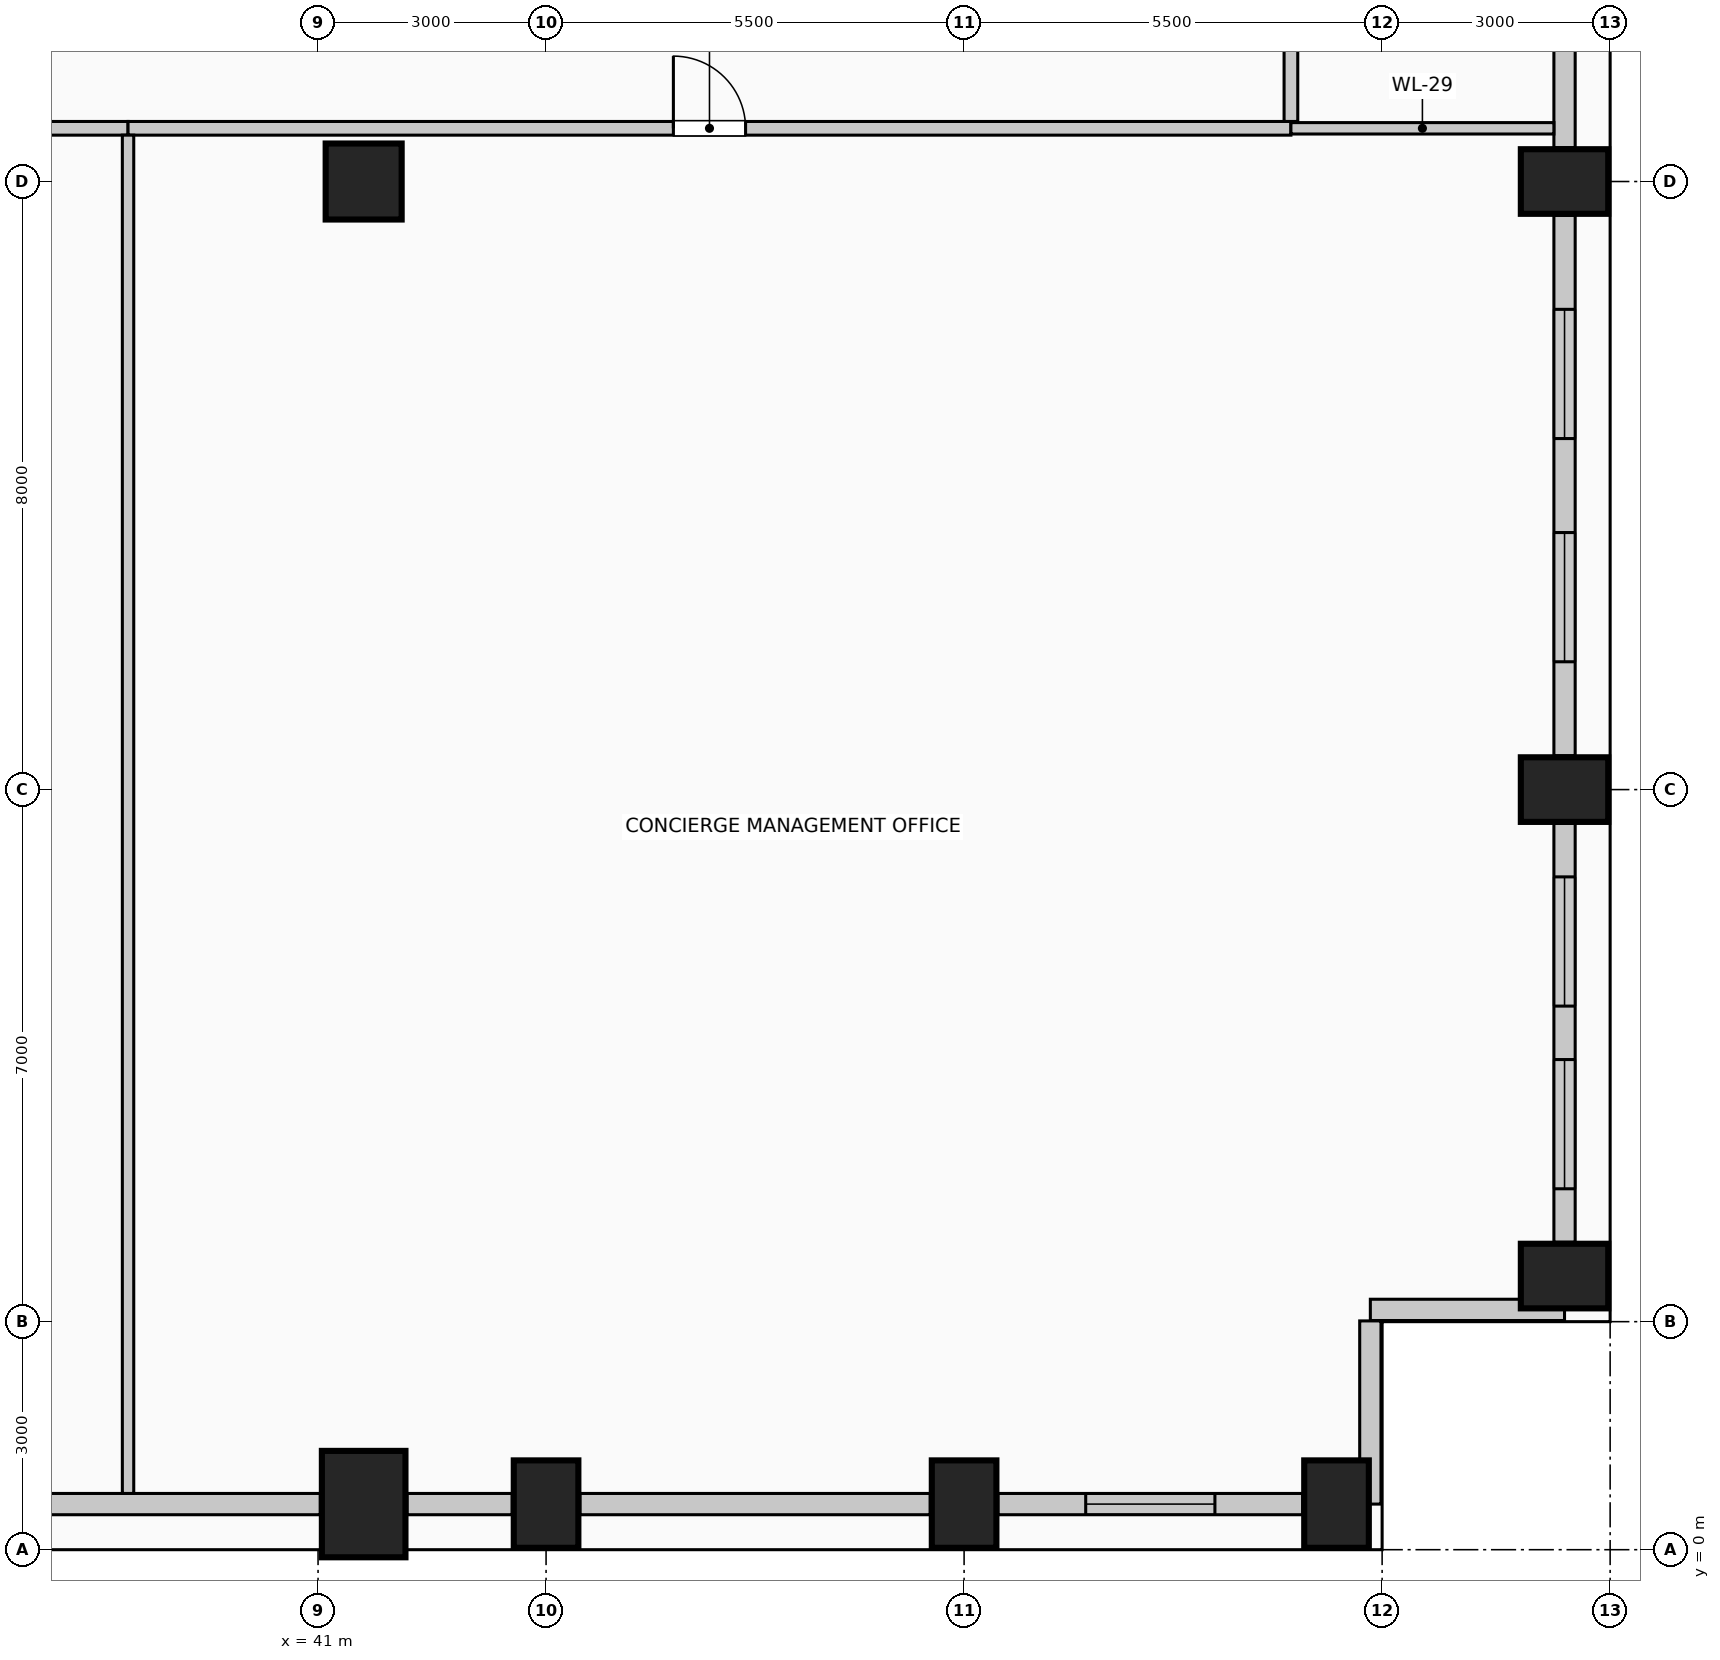
"""IFC4 building model, lengths in metres.
Left out: names, types, materials, properties, quantities, classifications, styles, units other than length and angle.
Written with IfcOpenShell. Run it as: python <this file> out.ifc"""

import sys

from ifc_helpers import new_model, si_unit, direction, frame, frame_2d, origin, origin_2d, place, context, subcontext, project, spatial, rectangle, circle, extrude, element, fill, save


model = new_model("IFC4")
c1 = context("Model", 3, precision=1e-05, world=origin(), true_north=direction((0.0, 1.0)))
c2 = subcontext(c1, "Body", "Model", "MODEL_VIEW")
j1 = project(units=[si_unit("LENGTHUNIT", "METRE"), si_unit("PLANEANGLEUNIT", "RADIAN")], contexts=[c1])
p1 = place(None, origin())
s1 = spatial("IfcSite", under=j1, at=p1, CompositionType="ELEMENT")
p2 = place(p1, origin())
s2 = spatial("IfcBuilding", under=s1, at=p2, CompositionType="ELEMENT")
p3 = place(p2, frame((0.0, 0.0, 87.8)))
s3 = spatial("IfcBuildingStorey", under=s2, at=p3, CompositionType="ELEMENT", Elevation=87.8)
p4 = place(p3, frame((41.6, 0.6, 0.0), z_axis=(0.0, 0.0, 1.0), x_axis=(1.0, 0.0, 0.0)))
e1 = element("IfcColumn", 1, at=p4, inside=s3, PredefinedType="COLUMN", context=c2, shape_type="SweptSolid", body=[
    extrude(rectangle(XDim=1.1, YDim=1.4, at=origin_2d()), origin(), (0.0, 0.0, 1.0), 4.8),
])
for number, where, z_axis, x_axis in (
    (2, (44.0, 0.6, 0.0), (0.0, 0.0, 1.0), (1.0, 0.0, 0.0)),
    (3, (49.5, 0.6, 0.0), (0.0, 0.0, 1.0), (1.0, 0.0, 0.0)),
    (4, (54.4, 0.6, 0.0), (0.0, 0.0, 1.0), (1.0, 0.0, 0.0)),
    (5, (57.4, 3.6, 0.0), (0.0, 0.0, 1.0), (0.0, 1.0, 0.0)),
    (6, (57.4, 10.0, 0.0), (0.0, 0.0, 1.0), (0.0, 1.0, 0.0)),
    (7, (57.4, 18.0, 0.0), (0.0, 0.0, 1.0), (0.0, 1.0, 0.0)),
):
    element("IfcColumn", number, at=place(p3, frame(where, z_axis=z_axis, x_axis=x_axis)), inside=s3, PredefinedType="COLUMN", context=c2, shape_type="SweptSolid", body=[
        extrude(rectangle(XDim=0.85, YDim=1.15, at=origin_2d()), origin(), (0.0, 0.0, 1.0), 4.8),
    ])
p5 = place(p3, frame((41.6, 18.0, 0.0), z_axis=(0.0, 0.0, 1.0), x_axis=(1.0, 0.0, 0.0)))
e8 = element("IfcColumn", 8, at=p5, inside=s3, PredefinedType="COLUMN", context=c2, shape_type="SweptSolid", body=[
    extrude(circle(Radius=0.5, at=origin_2d()), origin(), (0.0, 0.0, 1.0), 4.8),
])
p6 = place(p3, frame((41.03, 0.6, 0.0), z_axis=(0.0, 0.0, 1.0), x_axis=(-1.0, 0.0, 0.0)))
e9 = element("IfcWall", 9, at=p6, inside=s3, PredefinedType="SOLIDWALL", context=c2, shape_type="SweptSolid", body=[
    extrude(rectangle(XDim=6.46, YDim=0.28, at=frame_2d((3.23, 0.0))), origin(), (0.0, 0.0, 1.0), 3.675),
])
p7 = place(p6, frame((3.74, 0.0, 0.5)))
e10 = element("IfcOpeningElement", 10, at=p7, cuts=e9, PredefinedType="OPENING", context=c2, shape_type="SweptSolid", body=[
    extrude(rectangle(XDim=1.7, YDim=1.95, at=frame_2d((0.85, 0.975))), frame((0.0, 0.15, 0.0), z_axis=(0.0, -1.0, 0.0), x_axis=(1.0, 0.0, 0.0)), (0.0, 0.0, 1.0), 0.3),
])
p8 = place(p3, frame((43.555, 0.6, 0.0), z_axis=(0.0, 0.0, 1.0), x_axis=(-1.0, 0.0, 0.0)))
e11 = element("IfcWall", 11, at=p8, inside=s3, PredefinedType="SOLIDWALL", context=c2, shape_type="SweptSolid", body=[
    extrude(rectangle(XDim=1.385, YDim=0.28, at=frame_2d((0.692, 0.0))), origin(), (0.0, 0.0, 1.0), 3.675),
])
p9 = place(p3, frame((49.055, 0.6, 0.0), z_axis=(0.0, 0.0, 1.0), x_axis=(-1.0, 0.0, 0.0)))
e12 = element("IfcWall", 12, at=p9, inside=s3, PredefinedType="SOLIDWALL", context=c2, shape_type="SweptSolid", body=[
    extrude(rectangle(XDim=4.61, YDim=0.28, at=frame_2d((2.305, 0.0))), origin(), (0.0, 0.0, 1.0), 3.675),
])
p10 = place(p3, frame((53.955, 0.6, 0.0), z_axis=(0.0, 0.0, 1.0), x_axis=(-1.0, 0.0, 0.0)))
e13 = element("IfcWall", 13, at=p10, inside=s3, PredefinedType="SOLIDWALL", context=c2, shape_type="SweptSolid", body=[
    extrude(rectangle(XDim=4.01, YDim=0.28, at=frame_2d((2.005, 0.0))), origin(), (0.0, 0.0, 1.0), 3.675),
])
p11 = place(p10, frame((1.155, 0.0, 0.5)))
e14 = element("IfcOpeningElement", 14, at=p11, cuts=e13, PredefinedType="OPENING", context=c2, shape_type="SweptSolid", body=[
    extrude(rectangle(XDim=1.7, YDim=1.95, at=frame_2d((0.85, 0.975))), frame((0.0, 0.15, 0.0), z_axis=(0.0, -1.0, 0.0), x_axis=(1.0, 0.0, 0.0)), (0.0, 0.0, 1.0), 0.3),
])
p12 = place(p3, frame((57.4, 9.555, 0.0), z_axis=(0.0, 0.0, 1.0), x_axis=(0.0, -1.0, 0.0)))
e15 = element("IfcWall", 15, at=p12, inside=s3, PredefinedType="SOLIDWALL", context=c2, shape_type="SweptSolid", body=[
    extrude(rectangle(XDim=5.51, YDim=0.28, at=frame_2d((2.755, 0.0))), origin(), (0.0, 0.0, 1.0), 3.675),
])
p13 = place(p12, frame((0.703, 0.0, 0.5)))
e16 = element("IfcOpeningElement", 16, at=p13, cuts=e15, PredefinedType="OPENING", context=c2, shape_type="SweptSolid", body=[
    extrude(rectangle(XDim=1.7, YDim=1.95, at=frame_2d((0.85, 0.975))), frame((0.0, 0.15, 0.0), z_axis=(0.0, -1.0, 0.0), x_axis=(1.0, 0.0, 0.0)), (0.0, 0.0, 1.0), 0.3),
])
p14 = place(p12, frame((3.107, 0.0, 0.5)))
e17 = element("IfcOpeningElement", 17, at=p14, cuts=e15, PredefinedType="OPENING", context=c2, shape_type="SweptSolid", body=[
    extrude(rectangle(XDim=1.7, YDim=1.95, at=frame_2d((0.85, 0.975))), frame((0.0, 0.15, 0.0), z_axis=(0.0, -1.0, 0.0), x_axis=(1.0, 0.0, 0.0)), (0.0, 0.0, 1.0), 0.3),
])
p15 = place(p3, frame((57.4, 17.555, 0.0), z_axis=(0.0, 0.0, 1.0), x_axis=(0.0, -1.0, 0.0)))
e18 = element("IfcWall", 18, at=p15, inside=s3, PredefinedType="SOLIDWALL", context=c2, shape_type="SweptSolid", body=[
    extrude(rectangle(XDim=7.11, YDim=0.28, at=frame_2d((3.555, 0.0))), origin(), (0.0, 0.0, 1.0), 3.675),
])
p16 = place(p15, frame((1.237, 0.0, 0.5)))
e19 = element("IfcOpeningElement", 19, at=p16, cuts=e18, PredefinedType="OPENING", context=c2, shape_type="SweptSolid", body=[
    extrude(rectangle(XDim=1.7, YDim=1.95, at=frame_2d((0.85, 0.975))), frame((0.0, 0.15, 0.0), z_axis=(0.0, -1.0, 0.0), x_axis=(1.0, 0.0, 0.0)), (0.0, 0.0, 1.0), 0.3),
])
p17 = place(p15, frame((4.173, 0.0, 0.5)))
e20 = element("IfcOpeningElement", 20, at=p17, cuts=e18, PredefinedType="OPENING", context=c2, shape_type="SweptSolid", body=[
    extrude(rectangle(XDim=1.7, YDim=1.95, at=frame_2d((0.85, 0.975))), frame((0.0, 0.15, 0.0), z_axis=(0.0, -1.0, 0.0), x_axis=(1.0, 0.0, 0.0)), (0.0, 0.0, 1.0), 0.3),
])
p18 = place(p3, frame((57.4, 25.555, 0.0), z_axis=(0.0, 0.0, 1.0), x_axis=(0.0, -1.0, 0.0)))
e21 = element("IfcWall", 21, at=p18, inside=s3, PredefinedType="SOLIDWALL", context=c2, shape_type="SweptSolid", body=[
    extrude(rectangle(XDim=7.11, YDim=0.28, at=frame_2d((3.555, 0.0))), origin(), (0.0, 0.0, 1.0), 3.675),
])
p19 = place(p3, frame((57.4, 3.155, 0.0), z_axis=(0.0, 0.0, 1.0), x_axis=(-1.0, 0.0, 0.0)))
e22 = element("IfcWall", 22, at=p19, inside=s3, PredefinedType="SOLIDWALL", context=c2, shape_type="SweptSolid", body=[
    extrude(rectangle(XDim=2.555, YDim=0.28, at=frame_2d((1.277, 0.0))), origin(), (0.0, 0.0, 1.0), 4.525),
])
p20 = place(p3, frame((54.845, 3.01, 0.0), z_axis=(0.0, 0.0, 1.0), x_axis=(0.0, -1.0, 0.0)))
e23 = element("IfcWall", 23, at=p20, inside=s3, PredefinedType="SOLIDWALL", context=c2, shape_type="SweptSolid", body=[
    extrude(rectangle(XDim=2.41, YDim=0.28, at=frame_2d((1.205, 0.0))), origin(), (0.0, 0.0, 1.0), 4.525),
])
p21 = place(p3, frame((20.5, 18.7, 0.0), z_axis=(0.0, 0.0, 1.0), x_axis=(1.0, 0.0, 0.0)))
e24 = element("IfcWall", 24, at=p21, inside=s3, PredefinedType="PARTITIONING", context=c2, shape_type="SweptSolid", body=[
    extrude(rectangle(XDim=18.0, YDim=0.18, at=frame_2d((9.0, 0.0))), origin(), (0.0, 0.0, 1.0), 4.525),
])
p22 = place(p21, frame((10.46, 0.0, 0.0)))
e25 = element("IfcOpeningElement", 25, at=p22, cuts=e24, PredefinedType="OPENING", context=c2, shape_type="SweptSolid", body=[
    extrude(rectangle(XDim=1.4, YDim=2.2, at=frame_2d((0.7, 1.1))), frame((0.0, 0.1, 0.0), z_axis=(0.0, -1.0, 0.0), x_axis=(1.0, 0.0, 0.0)), (0.0, 0.0, 1.0), 0.2),
])
p23 = place(p3, frame((38.5, 18.7, 0.0), z_axis=(0.0, 0.0, 1.0), x_axis=(1.0, 0.0, 0.0)))
e26 = element("IfcWall", 26, at=p23, inside=s3, PredefinedType="PARTITIONING", context=c2, shape_type="SweptSolid", body=[
    extrude(rectangle(XDim=15.3, YDim=0.18, at=frame_2d((7.65, 0.0))), origin(), (0.0, 0.0, 1.0), 4.525),
])
p24 = place(p23, frame((7.175, 0.0, 0.0)))
e27 = element("IfcOpeningElement", 27, at=p24, cuts=e26, PredefinedType="OPENING", context=c2, shape_type="SweptSolid", body=[
    extrude(rectangle(XDim=0.95, YDim=2.15, at=frame_2d((0.475, 1.075))), frame((0.0, 0.1, 0.0), z_axis=(0.0, -1.0, 0.0), x_axis=(1.0, 0.0, 0.0)), (0.0, 0.0, 1.0), 0.2),
])
p25 = place(p3, frame((53.8, 18.7, 0.0), z_axis=(0.0, 0.0, 1.0), x_axis=(1.0, 0.0, 0.0)))
e28 = element("IfcWall", 28, at=p25, inside=s3, PredefinedType="PARTITIONING", context=c2, shape_type="SweptSolid", body=[
    extrude(rectangle(XDim=3.46, YDim=0.15, at=frame_2d((1.73, 0.0))), origin(), (0.0, 0.0, 1.0), 4.525),
])
p26 = place(p3, frame((38.5, 0.74, 0.0), z_axis=(0.0, 0.0, 1.0), x_axis=(0.0, 1.0, 0.0)))
e29 = element("IfcWall", 29, at=p26, inside=s3, PredefinedType="PARTITIONING", context=c2, shape_type="SweptSolid", body=[
    extrude(rectangle(XDim=17.87, YDim=0.15, at=frame_2d((8.935, 0.0))), origin(), (0.0, 0.0, 1.0), 4.525),
])
p27 = place(p3, frame((53.8, 18.79, 0.0), z_axis=(0.0, 0.0, 1.0), x_axis=(0.0, 1.0, 0.0)))
e30 = element("IfcWall", 30, at=p27, inside=s3, PredefinedType="PARTITIONING", context=c2, shape_type="SweptSolid", body=[
    extrude(rectangle(XDim=1.32, YDim=0.18, at=frame_2d((0.66, 0.0))), origin(), (0.0, 0.0, 1.0), 4.525),
])
p28 = place(p11, origin())
e31 = element("IfcWindow", 31, at=p28, inside=s3, PartitioningType="SINGLE_PANEL", PredefinedType="WINDOW", context=c2, shape_type="SweptSolid", body=[
    extrude(rectangle(XDim=1.7, YDim=1.95, at=frame_2d((0.85, 0.975))), frame((0.0, 0.03, 0.0), z_axis=(0.0, -1.0, 0.0), x_axis=(1.0, 0.0, 0.0)), (0.0, 0.0, 1.0), 0.06),
])
fill(e14, e31)
p29 = place(p13, origin())
e32 = element("IfcWindow", 32, at=p29, inside=s3, PartitioningType="SINGLE_PANEL", PredefinedType="WINDOW", context=c2, shape_type="SweptSolid", body=[
    extrude(rectangle(XDim=1.7, YDim=1.95, at=frame_2d((0.85, 0.975))), frame((0.0, 0.03, 0.0), z_axis=(0.0, -1.0, 0.0), x_axis=(1.0, 0.0, 0.0)), (0.0, 0.0, 1.0), 0.06),
])
fill(e16, e32)
p30 = place(p14, origin())
e33 = element("IfcWindow", 33, at=p30, inside=s3, PartitioningType="SINGLE_PANEL", PredefinedType="WINDOW", context=c2, shape_type="SweptSolid", body=[
    extrude(rectangle(XDim=1.7, YDim=1.95, at=frame_2d((0.85, 0.975))), frame((0.0, 0.03, 0.0), z_axis=(0.0, -1.0, 0.0), x_axis=(1.0, 0.0, 0.0)), (0.0, 0.0, 1.0), 0.06),
])
fill(e17, e33)
p31 = place(p16, origin())
e34 = element("IfcWindow", 34, at=p31, inside=s3, PartitioningType="SINGLE_PANEL", PredefinedType="WINDOW", context=c2, shape_type="SweptSolid", body=[
    extrude(rectangle(XDim=1.7, YDim=1.95, at=frame_2d((0.85, 0.975))), frame((0.0, 0.03, 0.0), z_axis=(0.0, -1.0, 0.0), x_axis=(1.0, 0.0, 0.0)), (0.0, 0.0, 1.0), 0.06),
])
fill(e19, e34)
p32 = place(p17, origin())
e35 = element("IfcWindow", 35, at=p32, inside=s3, PartitioningType="SINGLE_PANEL", PredefinedType="WINDOW", context=c2, shape_type="SweptSolid", body=[
    extrude(rectangle(XDim=1.7, YDim=1.95, at=frame_2d((0.85, 0.975))), frame((0.0, 0.03, 0.0), z_axis=(0.0, -1.0, 0.0), x_axis=(1.0, 0.0, 0.0)), (0.0, 0.0, 1.0), 0.06),
])
fill(e20, e35)
p33 = place(p24, origin())
e36 = element("IfcDoor", 36, at=p33, inside=s3, OperationType="SINGLE_SWING_LEFT", PredefinedType="DOOR", context=c2, shape_type="SweptSolid", body=[
    extrude(rectangle(XDim=0.95, YDim=2.15, at=frame_2d((0.475, 1.075))), frame((0.0, 0.025, 0.0), z_axis=(0.0, -1.0, 0.0), x_axis=(1.0, 0.0, 0.0)), (0.0, 0.0, 1.0), 0.05),
])
fill(e27, e36)
save(model, sys.argv[1])
